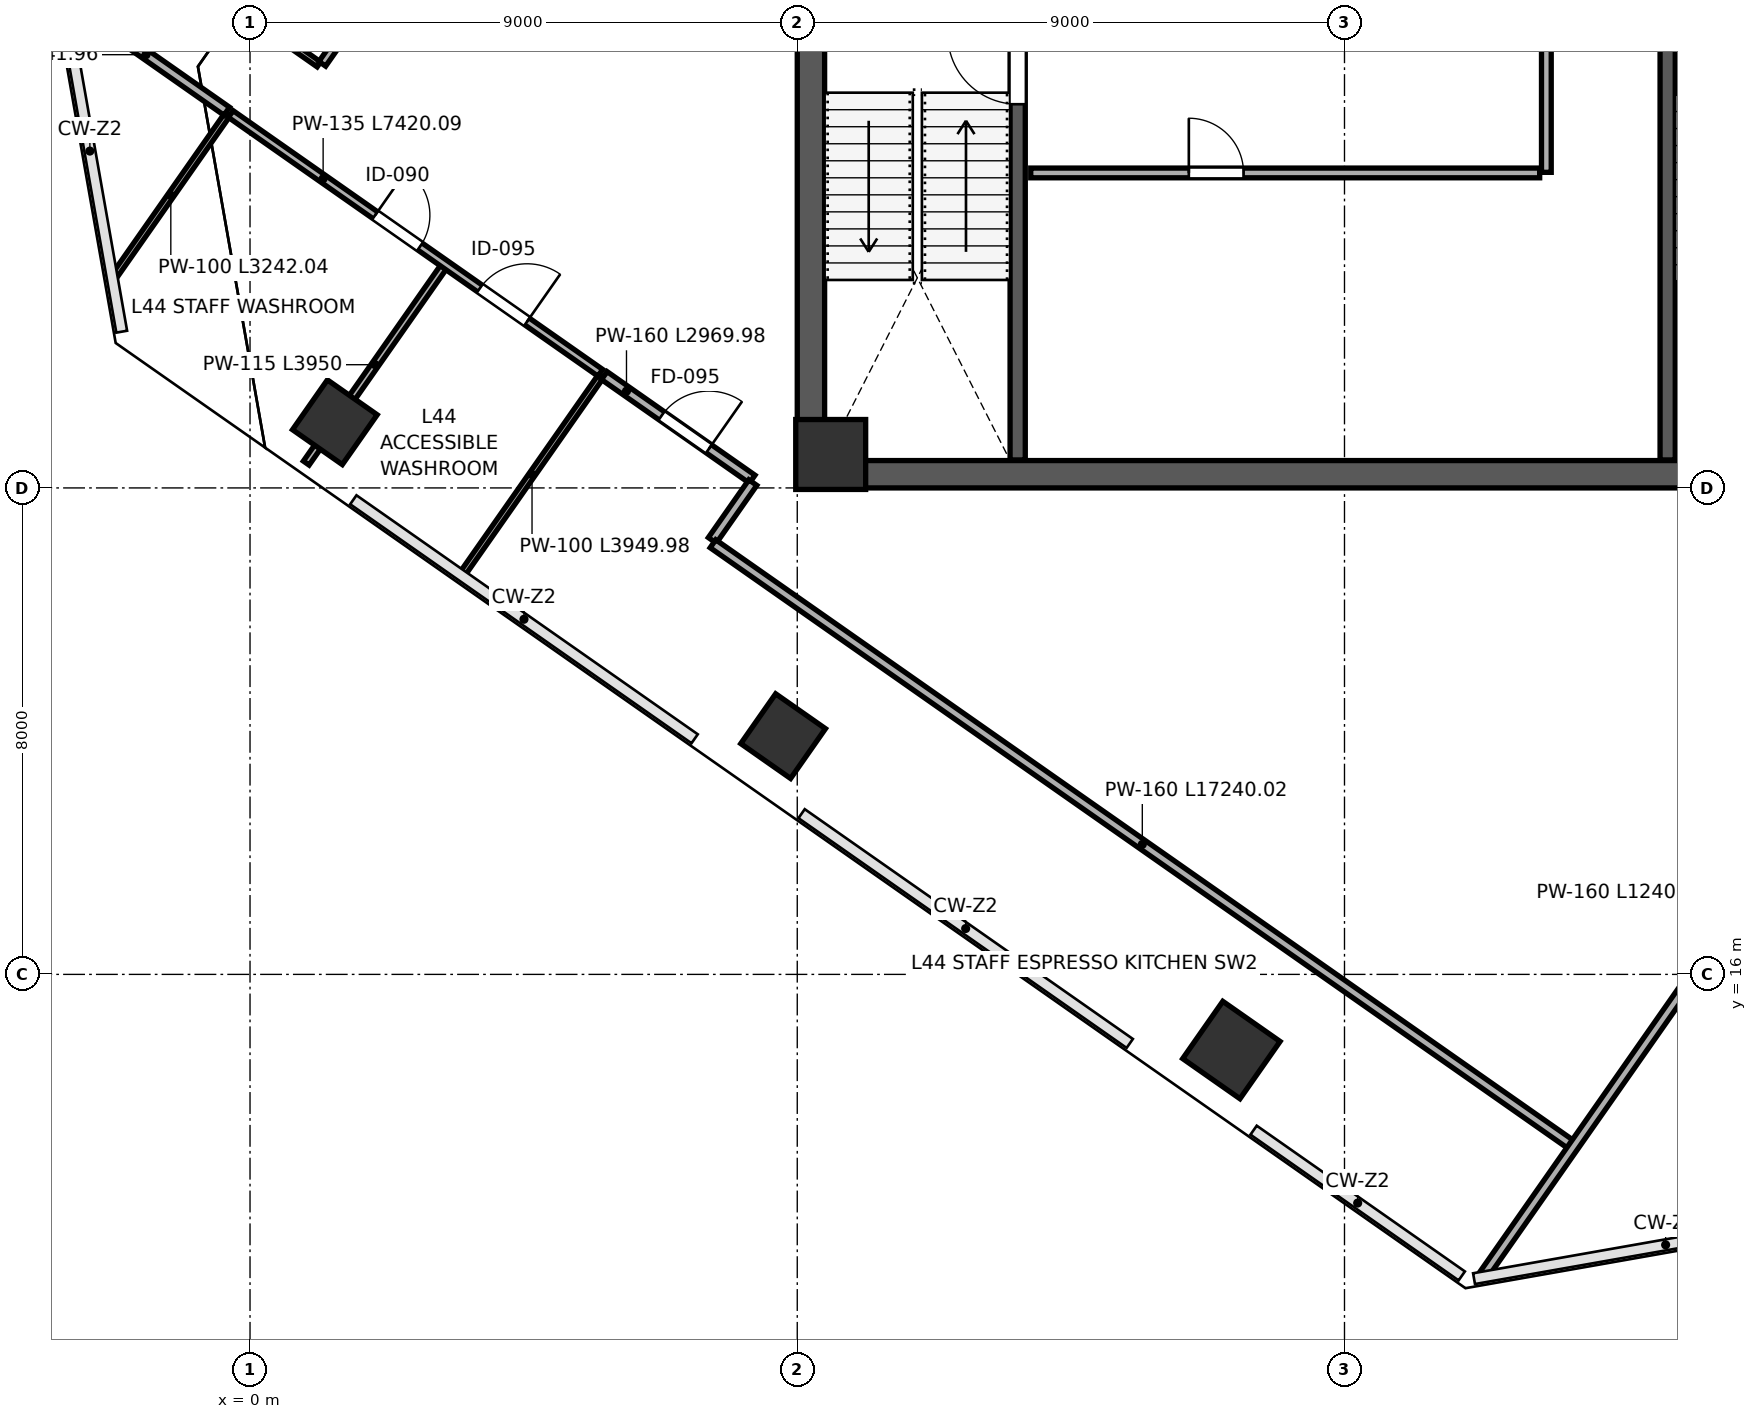
"""IFC4 building model, lengths in metres.
Left out: names, types, materials, properties, quantities, classifications, styles, units other than length and angle.
Written with IfcOpenShell. Run it as: python <this file> out.ifc"""

import sys

from ifc_helpers import new_model, si_unit, direction, frame, frame_2d, origin, origin_2d, place, context, subcontext, project, spatial, rectangle, extrude, clip, halfspace, source, transform, mapped, element, fill, save


model = new_model("IFC4")
c1 = context("Model", 3, precision=1e-05, world=origin(), true_north=direction((0.0, 1.0)))
c2 = subcontext(c1, "Body", "Model", "MODEL_VIEW")
j1 = project(units=[si_unit("LENGTHUNIT", "METRE"), si_unit("PLANEANGLEUNIT", "RADIAN")], contexts=[c1])
p1 = place(None, origin())
s1 = spatial("IfcSite", under=j1, at=p1, CompositionType="ELEMENT")
p2 = place(p1, origin())
s2 = spatial("IfcBuilding", under=s1, at=p2, CompositionType="ELEMENT")
p3 = place(p2, frame((0.0, 0.0, 196.0)))
s3 = spatial("IfcBuildingStorey", under=s2, at=p3, CompositionType="ELEMENT", Elevation=196.0)
m1 = source(origin(), c2, "Body", "SweptSolid", [
    extrude(rectangle(XDim=1.15, YDim=1.15, at=origin_2d()), origin(), (0.0, 0.0, 1.0), 4.198),
])
p4 = place(p3, frame((9.55, 24.55, 0.001), z_axis=(0.0, 0.0, 1.0), x_axis=(1.0, 0.0, 0.0)))
e1 = element("IfcColumn", 1, at=p4, inside=s3, PredefinedType="COLUMN", context=c2, shape_type="MappedRepresentation", body=[
    mapped(m1, transform((0.0, 0.0, 0.0), scale=1.0)),
])
p5 = place(p3, frame((1.395, 25.08, 0.0), z_axis=(-0.034609084953, 0.104173923488, 0.993956741968), x_axis=(0.957118609738, -0.282771356171, 0.062962901959)))
e2 = element("IfcColumn", 2, at=p5, inside=s3, PredefinedType="COLUMN", context=c2, shape_type="Clipping", body=[
    clip(clip(extrude(rectangle(XDim=1.0, YDim=1.0, at=origin_2d()), origin(), (0.0, 0.0, 1.0), 4.226), halfspace(frame((0.0, 0.0, 0.078), z_axis=(0.0, 0.0, -1.0), x_axis=(1.0, 0.0, 0.0)), False)), halfspace(frame((0.0, 0.0, 4.148), z_axis=(0.0, 0.0, 1.0), x_axis=(1.0, 0.0, 0.0)), False)),
])
p6 = place(p3, frame((8.768, 19.918, 0.0), z_axis=(-0.061825680858, 0.066514707216, 0.995868153377), x_axis=(0.988877780429, 0.139311449966, 0.052086997238)))
e3 = element("IfcColumn", 3, at=p6, inside=s3, PredefinedType="COLUMN", context=c2, shape_type="Clipping", body=[
    clip(clip(extrude(rectangle(XDim=1.0, YDim=1.0, at=origin_2d()), origin(), (0.0, 0.0, 1.0), 4.217), halfspace(frame((0.0, 0.0, 0.064), z_axis=(0.0, 0.0, -1.0), x_axis=(1.0, 0.0, 0.0)), False)), halfspace(frame((0.0, 0.0, 4.153), z_axis=(0.0, 0.0, 1.0), x_axis=(1.0, 0.0, 0.0)), False)),
])
p7 = place(p3, frame((16.14, 14.756, 0.0), z_axis=(-0.088896313986, 0.028706101391, 0.995627141606), x_axis=(0.795156403411, 0.604032558961, 0.053581357112)))
e4 = element("IfcColumn", 4, at=p7, inside=s3, PredefinedType="COLUMN", context=c2, shape_type="Clipping", body=[
    clip(clip(extrude(rectangle(XDim=1.15, YDim=1.15, at=origin_2d()), origin(), (0.0, 0.0, 1.0), 4.219), halfspace(frame((0.0, 0.0, 0.076), z_axis=(0.0, 0.0, -1.0), x_axis=(1.0, 0.0, 0.0)), False)), halfspace(frame((0.0, 0.0, 4.143), z_axis=(0.0, 0.0, 1.0), x_axis=(1.0, 0.0, 0.0)), False)),
])
p8 = place(p3, frame((9.225, 24.45, 0.0), z_axis=(0.0, 0.0, 1.0), x_axis=(0.0, 1.0, 0.0)))
e5 = element("IfcWall", 5, at=p8, inside=s3, PredefinedType="SHEAR", context=c2, shape_type="SweptSolid", body=[
    extrude(rectangle(XDim=15.1, YDim=0.45, at=frame_2d((7.55, 0.0))), origin(), (0.0, 0.0, 1.0), 3.96),
])
p9 = place(p3, frame((9.0, 24.225, 0.0), z_axis=(0.0, 0.0, 1.0), x_axis=(1.0, 0.0, 0.0)))
e6 = element("IfcWall", 6, at=p9, inside=s3, PredefinedType="SHEAR", context=c2, shape_type="SweptSolid", body=[
    extrude(rectangle(XDim=18.0, YDim=0.45, at=frame_2d((9.0, 0.0))), origin(), (0.0, 0.0, 1.0), 3.96),
])
p10 = place(p3, frame((12.625, 24.46, 0.0), z_axis=(0.0, 0.0, 1.0), x_axis=(0.0, 1.0, 0.0)))
e7 = element("IfcWall", 7, at=p10, inside=s3, PredefinedType="SHEAR", context=c2, shape_type="SweptSolid", body=[
    extrude(rectangle(XDim=7.49, YDim=0.25, at=frame_2d((3.745, 0.0))), origin(), (0.0, 0.0, 1.0), 3.96),
])
p11 = place(p10, frame((5.85, 0.0, 0.0)))
e8 = element("IfcOpeningElement", 8, at=p11, cuts=e7, PredefinedType="OPENING", context=c2, shape_type="SweptSolid", body=[
    extrude(rectangle(XDim=1.15, YDim=2.2, at=frame_2d((0.575, 1.1))), frame((0.0, 0.135, 0.0), z_axis=(0.0, -1.0, 0.0), x_axis=(1.0, 0.0, 0.0)), (0.0, 0.0, 1.0), 0.27),
])
p12 = place(p3, frame((23.315, 24.46, 0.0), z_axis=(0.0, 0.0, 1.0), x_axis=(0.0, 1.0, 0.0)))
e9 = element("IfcWall", 9, at=p12, inside=s3, PredefinedType="SHEAR", context=c2, shape_type="SweptSolid", body=[
    extrude(rectangle(XDim=7.49, YDim=0.25, at=frame_2d((3.745, 0.0))), origin(), (0.0, 0.0, 1.0), 3.96),
])
p13 = place(p3, frame((12.84, 29.18, 0.0), z_axis=(0.0, 0.0, 1.0), x_axis=(1.0, 0.0, 0.0)))
e10 = element("IfcWall", 10, at=p13, inside=s3, PredefinedType="PARTITIONING", context=c2, shape_type="SweptSolid", body=[
    extrude(rectangle(XDim=8.37, YDim=0.16, at=frame_2d((4.185, 0.0))), origin(), (0.0, 0.0, 1.0), 3.96),
])
p14 = place(p13, frame((2.6, 0.0, 0.0)))
e11 = element("IfcOpeningElement", 11, at=p14, cuts=e10, PredefinedType="OPENING", context=c2, shape_type="SweptSolid", body=[
    extrude(rectangle(XDim=0.9, YDim=2.15, at=frame_2d((0.45, 1.075))), frame((0.0, 0.09, 0.0), z_axis=(0.0, -1.0, 0.0), x_axis=(1.0, 0.0, 0.0)), (0.0, 0.0, 1.0), 0.18),
])
p15 = place(p3, frame((21.32, 29.19, 0.0), z_axis=(0.0, 0.0, 1.0), x_axis=(0.0, 1.0, 0.0)))
e12 = element("IfcWall", 12, at=p15, inside=s3, PredefinedType="PARTITIONING", context=c2, shape_type="SweptSolid", body=[
    extrude(rectangle(XDim=2.92, YDim=0.16, at=frame_2d((1.46, 0.0))), origin(), (0.0, 0.0, 1.0), 3.96),
])
p16 = place(p3, frame((-2.232, 27.484, 0.0), z_axis=(0.0, 0.0, 1.0), x_axis=(0.573583631645, 0.819147006043, 0.0)))
e13 = element("IfcWall", 13, at=p16, inside=s3, PredefinedType="PARTITIONING", context=c2, shape_type="SweptSolid", body=[
    extrude(rectangle(XDim=3.242, YDim=0.1, at=frame_2d((1.621, 0.0))), origin(), (0.0, 0.0, 1.0), 3.96),
])
p17 = place(p3, frame((-3.038, 32.055, 0.0), z_axis=(0.0, 0.0, 1.0), x_axis=(0.819122229171, -0.573619014397, 0.0)))
e14 = element("IfcWall", 14, at=p17, inside=s3, PredefinedType="PARTITIONING", context=c2, shape_type="SweptSolid", body=[
    extrude(rectangle(XDim=3.242, YDim=0.16, at=frame_2d((1.621, 0.0))), origin(), (0.0, 0.0, 1.0), 3.96),
])
p18 = place(p3, frame((0.925, 24.409, 0.0), z_axis=(0.0, 0.0, 1.0), x_axis=(0.573582636552, 0.819147702826, 0.0)))
e15 = element("IfcWall", 15, at=p18, inside=s3, PredefinedType="PARTITIONING", context=c2, shape_type="SweptSolid", body=[
    extrude(rectangle(XDim=3.95, YDim=0.115, at=frame_2d((1.975, 0.0))), origin(), (0.0, 0.0, 1.0), 3.195),
])
p19 = place(p3, frame((3.505, 22.602, 0.0), z_axis=(0.0, 0.0, 1.0), x_axis=(0.573624108016, 0.819118662163, 0.0)))
e16 = element("IfcWall", 16, at=p19, inside=s3, PredefinedType="PARTITIONING", context=c2, shape_type="SweptSolid", body=[
    extrude(rectangle(XDim=3.95, YDim=0.1, at=frame_2d((1.975, 0.0))), origin(), (0.0, 0.0, 1.0), 3.195),
])
p20 = place(p3, frame((-0.317, 30.149, 0.0), z_axis=(0.0, 0.0, 1.0), x_axis=(0.819142256539, -0.573590414454, 0.0)))
e17 = element("IfcWall", 17, at=p20, inside=s3, PredefinedType="PARTITIONING", context=c2, shape_type="SweptSolid", body=[
    extrude(rectangle(XDim=7.42, YDim=0.135, at=frame_2d((3.71, 0.0))), origin(), (0.0, 0.0, 1.0), 3.96),
])
p21 = place(p20, frame((2.9, 0.0, 0.0)))
e18 = element("IfcOpeningElement", 18, at=p21, cuts=e17, PredefinedType="OPENING", context=c2, shape_type="SweptSolid", body=[
    extrude(rectangle(XDim=0.9, YDim=2.15, at=frame_2d((0.45, 1.075))), frame((0.0, 0.078, 0.0), z_axis=(0.0, -1.0, 0.0), x_axis=(1.0, 0.0, 0.0)), (0.0, 0.0, 1.0), 0.155),
])
p22 = place(p20, frame((5.0, 0.0, 0.0)))
e19 = element("IfcOpeningElement", 19, at=p22, cuts=e17, PredefinedType="OPENING", context=c2, shape_type="SweptSolid", body=[
    extrude(rectangle(XDim=0.95, YDim=2.15, at=frame_2d((0.475, 1.075))), frame((0.0, 0.078, 0.0), z_axis=(0.0, -1.0, 0.0), x_axis=(1.0, 0.0, 0.0)), (0.0, 0.0, 1.0), 0.155),
])
p23 = place(p3, frame((5.826, 25.847, 0.0), z_axis=(0.0, 0.0, 1.0), x_axis=(0.819135363828, -0.573600257781, 0.0)))
e20 = element("IfcWall", 20, at=p23, inside=s3, PredefinedType="PARTITIONING", context=c2, shape_type="SweptSolid", body=[
    extrude(rectangle(XDim=2.97, YDim=0.16, at=frame_2d((1.485, 0.0))), origin(), (0.0, 0.0, 1.0), 3.96),
])
p24 = place(p23, frame((1.15, 0.0, 0.0)))
e21 = element("IfcOpeningElement", 21, at=p24, cuts=e20, PredefinedType="OPENING", context=c2, shape_type="SweptSolid", body=[
    extrude(rectangle(XDim=0.95, YDim=2.15, at=frame_2d((0.475, 1.075))), frame((0.0, 0.09, 0.0), z_axis=(0.0, -1.0, 0.0), x_axis=(1.0, 0.0, 0.0)), (0.0, 0.0, 1.0), 0.18),
])
p25 = place(p3, frame((8.269, 24.088, 0.0), z_axis=(0.0, 0.0, 1.0), x_axis=(-0.573787211882, -0.819004417253, 0.0)))
e22 = element("IfcWall", 22, at=p25, inside=s3, PredefinedType="PARTITIONING", context=c2, shape_type="SweptSolid", body=[
    extrude(rectangle(XDim=1.16, YDim=0.16, at=frame_2d((0.58, 0.0))), origin(), (0.0, 0.0, 1.0), 3.96),
])
p26 = place(p3, frame((7.614, 23.082, 0.0), z_axis=(0.0, 0.0, 1.0), x_axis=(0.819144092075, -0.573587793123, 0.0)))
e23 = element("IfcWall", 23, at=p26, inside=s3, PredefinedType="PARTITIONING", context=c2, shape_type="SweptSolid", body=[
    extrude(rectangle(XDim=17.24, YDim=0.16, at=frame_2d((8.62, 0.0))), origin(), (0.0, 0.0, 1.0), 3.96),
])
p27 = place(p3, frame((-2.496, 33.506, 0.0), z_axis=(0.0, 0.0, 1.0), x_axis=(0.819130930641, -0.573606588584, 0.0)))
e24 = element("IfcWall", 24, at=p27, inside=s3, PredefinedType="PARTITIONING", context=c2, shape_type="SweptSolid", body=[
    extrude(rectangle(XDim=4.43, YDim=0.1, at=frame_2d((2.215, 0.0))), origin(), (0.0, 0.0, 1.0), 3.96),
])
p28 = place(p3, frame((1.189, 30.975, 0.0), z_axis=(0.0, 0.0, 1.0), x_axis=(0.573571020786, 0.819155836282, 0.0)))
e25 = element("IfcWall", 25, at=p28, inside=s3, PredefinedType="PARTITIONING", context=c2, shape_type="SweptSolid", body=[
    extrude(rectangle(XDim=23.67, YDim=0.135, at=frame_2d((11.835, 0.0))), origin(), (0.0, 0.0, 1.0), 3.96),
])
p29 = place(p28, frame((6.6, 0.0, 0.0)))
e26 = element("IfcOpeningElement", 26, at=p29, cuts=e25, PredefinedType="OPENING", context=c2, shape_type="SweptSolid", body=[
    extrude(rectangle(XDim=0.95, YDim=2.15, at=frame_2d((0.475, 1.075))), frame((0.0, 0.078, 0.0), z_axis=(0.0, -1.0, 0.0), x_axis=(1.0, 0.0, 0.0)), (0.0, 0.0, 1.0), 0.155),
])
p30 = place(p3, frame((20.293, 11.064, 0.0), z_axis=(0.0, 0.0, 1.0), x_axis=(0.573585209026, 0.819145901526, 0.0)))
e27 = element("IfcWall", 27, at=p30, inside=s3, PredefinedType="PARTITIONING", context=c2, shape_type="SweptSolid", body=[
    extrude(rectangle(XDim=12.402, YDim=0.16, at=frame_2d((6.201, 0.0))), origin(), (0.0, 0.0, 1.0), 3.96),
])
m2 = source(origin(), c2, "Body", "SweptSolid", [
    extrude(rectangle(XDim=1.15, YDim=2.2, at=frame_2d((0.575, 1.1))), frame((0.0, 0.025, 0.0), z_axis=(0.0, -1.0, 0.0), x_axis=(1.0, 0.0, 0.0)), (0.0, 0.0, 1.0), 0.05),
])
p31 = place(p11, origin())
e28 = element("IfcDoor", 28, at=p31, inside=s3, OperationType="SINGLE_SWING_RIGHT", PredefinedType="DOOR", context=c2, shape_type="MappedRepresentation", body=[
    mapped(m2, transform((0.0, 0.0, 0.0), scale=1.0)),
])
fill(e8, e28)
m3 = source(origin(), c2, "Body", "SweptSolid", [
    extrude(rectangle(XDim=0.9, YDim=2.15, at=frame_2d((0.45, 1.075))), frame((0.0, 0.025, 0.0), z_axis=(0.0, -1.0, 0.0), x_axis=(1.0, 0.0, 0.0)), (0.0, 0.0, 1.0), 0.05),
])
p32 = place(p14, origin())
e29 = element("IfcDoor", 29, at=p32, inside=s3, OperationType="SINGLE_SWING_LEFT", PredefinedType="DOOR", context=c2, shape_type="MappedRepresentation", body=[
    mapped(m3, transform((0.0, 0.0, 0.0), scale=1.0)),
])
fill(e11, e29)
m4 = source(origin(), c2, "Body", "SweptSolid", [
    extrude(rectangle(XDim=0.9, YDim=2.15, at=frame_2d((0.45, 1.075))), frame((0.0, 0.025, 0.0), z_axis=(0.0, -1.0, 0.0), x_axis=(1.0, 0.0, 0.0)), (0.0, 0.0, 1.0), 0.05),
])
p33 = place(p21, origin())
e30 = element("IfcDoor", 30, at=p33, inside=s3, OperationType="SINGLE_SWING_LEFT", PredefinedType="DOOR", context=c2, shape_type="MappedRepresentation", body=[
    mapped(m4, transform((0.0, 0.0, 0.0), scale=1.0)),
])
fill(e18, e30)
m5 = source(origin(), c2, "Body", "SweptSolid", [
    extrude(rectangle(XDim=0.95, YDim=2.15, at=frame_2d((0.475, 1.075))), frame((0.0, 0.025, 0.0), z_axis=(0.0, -1.0, 0.0), x_axis=(1.0, 0.0, 0.0)), (0.0, 0.0, 1.0), 0.05),
])
p34 = place(p22, origin())
e31 = element("IfcDoor", 31, at=p34, inside=s3, OperationType="SINGLE_SWING_RIGHT", PredefinedType="DOOR", context=c2, shape_type="MappedRepresentation", body=[
    mapped(m5, transform((0.0, 0.0, 0.0), scale=1.0)),
])
fill(e19, e31)
m6 = source(origin(), c2, "Body", "SweptSolid", [
    extrude(rectangle(XDim=0.95, YDim=2.15, at=frame_2d((0.475, 1.075))), frame((0.0, 0.025, 0.0), z_axis=(0.0, -1.0, 0.0), x_axis=(1.0, 0.0, 0.0)), (0.0, 0.0, 1.0), 0.05),
])
p35 = place(p24, origin())
e32 = element("IfcDoor", 32, at=p35, inside=s3, OperationType="SINGLE_SWING_RIGHT", PredefinedType="DOOR", context=c2, shape_type="MappedRepresentation", body=[
    mapped(m6, transform((0.0, 0.0, 0.0), scale=1.0)),
])
fill(e21, e32)
save(model, sys.argv[1])
